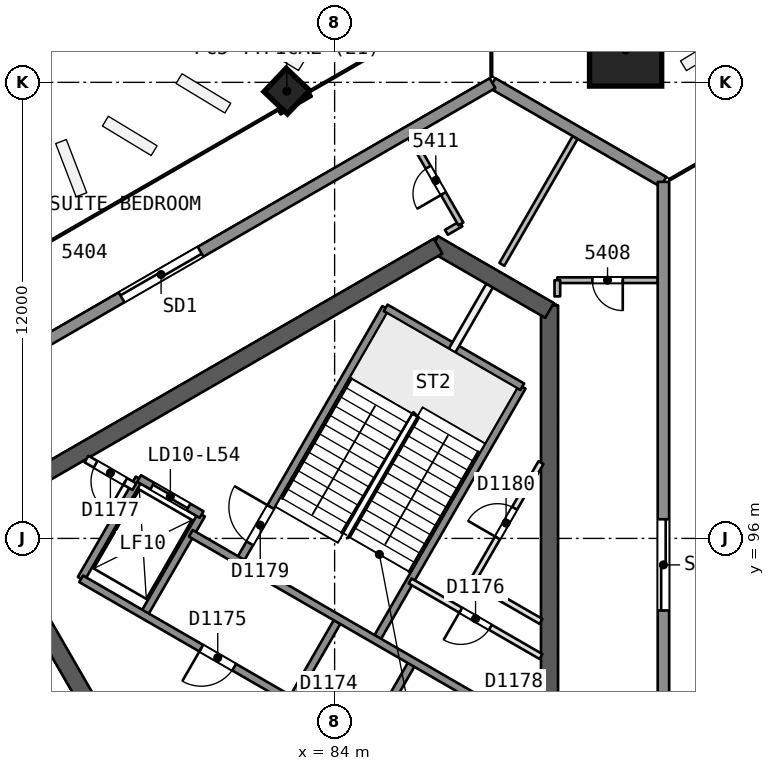
"""IFC4 building model, lengths in metres.
Left out: names, types, materials, properties, quantities, classifications, styles, units other than length and angle.
Written with IfcOpenShell. Run it as: python <this file> out.ifc"""

import sys

from ifc_helpers import new_model, si_unit, direction, frame, frame_2d, origin, origin_2d, place, context, subcontext, project, spatial, rectangle, extrude, element, fill, save


model = new_model("IFC4")
c1 = context("Model", 3, precision=1e-05, world=origin(), true_north=direction((0.0, 1.0)))
c2 = subcontext(c1, "Body", "Model", "MODEL_VIEW")
j1 = project(units=[si_unit("LENGTHUNIT", "METRE"), si_unit("PLANEANGLEUNIT", "RADIAN")], contexts=[c1])
p1 = place(None, origin())
s1 = spatial("IfcSite", under=j1, at=p1, CompositionType="ELEMENT")
p2 = place(p1, origin())
s2 = spatial("IfcBuilding", under=s1, at=p2, CompositionType="ELEMENT")
p3 = place(p2, frame((0.0, 0.0, 220.6)))
s3 = spatial("IfcBuildingStorey", under=s2, at=p3, CompositionType="ELEMENT", Elevation=220.6)
p4 = place(p3, frame((89.655, 88.019, 0.0), z_axis=(0.0, 0.0, 1.0), x_axis=(0.0, 1.0, 0.0)))
e1 = element("IfcWall", 1, at=p4, inside=s3, PredefinedType="SHEAR", context=c2, shape_type="SweptSolid", body=[
    extrude(rectangle(XDim=14.108, YDim=0.45, at=frame_2d((7.054, 0.0))), origin(), (0.0, 0.0, 1.0), 3.7),
])
p5 = place(p3, frame((89.655, 101.998, 0.0), z_axis=(0.0, 0.0, 1.0), x_axis=(-0.866042179588, 0.49997094233, 0.0)))
e2 = element("IfcWall", 2, at=p5, inside=s3, PredefinedType="SHEAR", context=c2, shape_type="SweptSolid", body=[
    extrude(rectangle(XDim=3.515, YDim=0.45, at=frame_2d((1.758, 0.0))), origin(), (0.0, 0.0, 1.0), 3.7),
])
p6 = place(p3, frame((86.723, 103.69, 0.0), z_axis=(0.0, 0.0, 1.0), x_axis=(-0.866022713978, -0.500004658852, 0.0)))
e3 = element("IfcWall", 3, at=p6, inside=s3, PredefinedType="SHEAR", context=c2, shape_type="SweptSolid", body=[
    extrude(rectangle(XDim=14.203, YDim=0.45, at=frame_2d((7.102, 0.0))), origin(), (0.0, 0.0, 1.0), 3.7),
])
p7 = place(p3, frame((74.617, 96.701, 0.0), z_axis=(0.0, 0.0, 1.0), x_axis=(0.499994385119, -0.866028645513, 0.0)))
e4 = element("IfcWall", 4, at=p7, inside=s3, PredefinedType="SHEAR", context=c2, shape_type="SweptSolid", body=[
    extrude(rectangle(XDim=10.155, YDim=0.45, at=frame_2d((5.077, 0.0))), origin(), (0.0, 0.0, 1.0), 3.7),
])
p8 = place(p7, frame((8.005, 0.0, 0.0)))
e5 = element("IfcOpeningElement", 5, at=p8, cuts=e4, PredefinedType="OPENING", context=c2, shape_type="SweptSolid", body=[
    extrude(rectangle(XDim=1.2, YDim=2.1, at=frame_2d((0.6, 1.05))), frame((0.0, 0.235, 0.0), z_axis=(0.0, -1.0, 0.0), x_axis=(1.0, 0.0, 0.0)), (0.0, 0.0, 1.0), 0.471),
])
p9 = place(p3, frame((91.678, 108.888, 0.0), z_axis=(-0.017607037296, -0.030466109479, 0.999380712447), x_axis=(0.500064653071, 0.865272876704, 0.035187946645)))
e6 = element("IfcColumn", 6, at=p9, inside=s3, PredefinedType="COLUMN", context=c2, shape_type="SweptSolid", body=[
    extrude(rectangle(XDim=1.9, YDim=1.9, at=origin_2d()), origin(), (0.0, 0.0, 1.0), 3.702),
])
p10 = place(p3, frame((82.752, 107.803, 0.0), z_axis=(-0.00837646992, -0.028097450282, 0.999570091609), x_axis=(0.866174253108, 0.499288249334, 0.021293363534)))
e7 = element("IfcColumn", 7, at=p10, inside=s3, PredefinedType="COLUMN", context=c2, shape_type="SweptSolid", body=[
    extrude(rectangle(XDim=0.85, YDim=0.85, at=origin_2d()), origin(), (0.0, 0.0, 1.0), 3.702),
])
p11 = place(p3, frame((92.503, 102.794, 0.0), z_axis=(0.0, 0.0, 1.0), x_axis=(-1.0, 0.0, 0.0)))
e8 = element("IfcWall", 8, at=p11, inside=s3, PredefinedType="PARTITIONING", context=c2, shape_type="SweptSolid", body=[
    extrude(rectangle(XDim=2.642, YDim=0.15, at=frame_2d((1.321, 0.0))), origin(), (0.0, 0.0, 1.0), 3.3),
])
p12 = place(p11, frame((0.921, 0.0, 0.0)))
e9 = element("IfcOpeningElement", 9, at=p12, cuts=e8, PredefinedType="OPENING", context=c2, shape_type="SweptSolid", body=[
    extrude(rectangle(XDim=0.8, YDim=2.1, at=frame_2d((0.4, 1.05))), frame((0.0, 0.085, 0.0), z_axis=(0.0, -1.0, 0.0), x_axis=(1.0, 0.0, 0.0)), (0.0, 0.0, 1.0), 0.171),
])
p13 = place(p3, frame((89.861, 102.794, 0.0), z_axis=(0.0, 0.0, 1.0), x_axis=(0.0, -1.0, 0.0)))
e10 = element("IfcWall", 10, at=p13, inside=s3, PredefinedType="PARTITIONING", context=c2, shape_type="SweptSolid", body=[
    extrude(rectangle(XDim=0.426, YDim=0.15, at=frame_2d((0.213, 0.0))), origin(), (0.0, 0.0, 1.0), 3.3),
])
p14 = place(p3, frame((90.33, 106.55, 0.0), z_axis=(0.0, 0.0, 1.0), x_axis=(-0.499980071345, -0.866036909293, 0.0)))
e11 = element("IfcWall", 11, at=p14, inside=s3, PredefinedType="PARTITIONING", context=c2, shape_type="SweptSolid", body=[
    extrude(rectangle(XDim=3.856, YDim=0.15, at=frame_2d((1.928, 0.0))), origin(), (0.0, 0.0, 1.0), 3.3),
])
p15 = place(p3, frame((86.941, 104.054, 0.0), z_axis=(0.0, 0.0, 1.0), x_axis=(0.866019606374, 0.500010041276, 0.0)))
e12 = element("IfcWall", 12, at=p15, inside=s3, PredefinedType="PARTITIONING", context=c2, shape_type="SweptSolid", body=[
    extrude(rectangle(XDim=0.441, YDim=0.15, at=frame_2d((0.22, 0.0))), origin(), (0.0, 0.0, 1.0), 3.3),
])
p16 = place(p3, frame((87.323, 104.275, 0.0), z_axis=(0.0, 0.0, 1.0), x_axis=(-0.50000507839, 0.866022471755, 0.0)))
e13 = element("IfcWall", 13, at=p16, inside=s3, PredefinedType="PARTITIONING", context=c2, shape_type="SweptSolid", body=[
    extrude(rectangle(XDim=2.642, YDim=0.15, at=frame_2d((1.321, 0.0))), origin(), (0.0, 0.0, 1.0), 3.3),
])
p17 = place(p16, frame((0.921, 0.0, 0.0)))
e14 = element("IfcOpeningElement", 14, at=p17, cuts=e13, PredefinedType="OPENING", context=c2, shape_type="SweptSolid", body=[
    extrude(rectangle(XDim=0.8, YDim=2.1, at=frame_2d((0.4, 1.05))), frame((0.0, 0.085, 0.0), z_axis=(0.0, -1.0, 0.0), x_axis=(1.0, 0.0, 0.0)), (0.0, 0.0, 1.0), 0.171),
])
p18 = place(p3, frame((88.155, 107.978, 0.0), z_axis=(0.0, 0.0, 1.0), x_axis=(0.866044673852, -0.499966621779, 0.0)))
e15 = element("IfcWall", 15, at=p18, inside=s3, PredefinedType="SOLIDWALL", context=c2, shape_type="SweptSolid", body=[
    extrude(rectangle(XDim=5.193, YDim=0.3, at=frame_2d((2.597, 0.0))), origin(), (0.0, 0.0, 1.0), 3.3),
])
p19 = place(p3, frame((92.652, 105.381, 0.0), z_axis=(0.0, 0.0, 1.0), x_axis=(0.0, -1.0, 0.0)))
e16 = element("IfcWall", 16, at=p19, inside=s3, PredefinedType="SOLIDWALL", context=c2, shape_type="SweptSolid", body=[
    extrude(rectangle(XDim=50.762, YDim=0.3, at=frame_2d((25.381, 0.0))), origin(), (0.0, 0.0, 1.0), 3.3),
])
p20 = place(p19, frame((29.325, 0.0, 0.0)))
e17 = element("IfcOpeningElement", 17, at=p20, cuts=e16, PredefinedType="OPENING", context=c2, shape_type="SweptSolid", body=[
    extrude(rectangle(XDim=2.4, YDim=2.4, at=frame_2d((1.2, 1.2))), frame((0.0, 0.161, 0.0), z_axis=(0.0, -1.0, 0.0), x_axis=(1.0, 0.0, 0.0)), (0.0, 0.0, 1.0), 0.321),
])
p21 = place(p19, frame((39.492, 0.0, 0.0)))
e18 = element("IfcOpeningElement", 18, at=p21, cuts=e16, PredefinedType="OPENING", context=c2, shape_type="SweptSolid", body=[
    extrude(rectangle(XDim=2.4, YDim=2.4, at=frame_2d((1.2, 1.2))), frame((0.0, 0.161, 0.0), z_axis=(0.0, -1.0, 0.0), x_axis=(1.0, 0.0, 0.0)), (0.0, 0.0, 1.0), 0.321),
])
p22 = place(p19, frame((18.881, 0.0, 0.0)))
e19 = element("IfcOpeningElement", 19, at=p22, cuts=e16, PredefinedType="OPENING", context=c2, shape_type="SweptSolid", body=[
    extrude(rectangle(XDim=2.4, YDim=2.4, at=frame_2d((1.2, 1.2))), frame((0.0, 0.161, 0.0), z_axis=(0.0, -1.0, 0.0), x_axis=(1.0, 0.0, 0.0)), (0.0, 0.0, 1.0), 0.321),
])
p23 = place(p19, frame((8.878, 0.0, 0.0)))
e20 = element("IfcOpeningElement", 20, at=p23, cuts=e16, PredefinedType="OPENING", context=c2, shape_type="SweptSolid", body=[
    extrude(rectangle(XDim=2.4, YDim=2.4, at=frame_2d((1.2, 1.2))), frame((0.0, 0.161, 0.0), z_axis=(0.0, -1.0, 0.0), x_axis=(1.0, 0.0, 0.0)), (0.0, 0.0, 1.0), 0.321),
])
p24 = place(p19, frame((24.025, 0.0, 0.0)))
e21 = element("IfcOpeningElement", 21, at=p24, cuts=e16, PredefinedType="OPENING", context=c2, shape_type="SweptSolid", body=[
    extrude(rectangle(XDim=2.4, YDim=2.4, at=frame_2d((1.2, 1.2))), frame((0.0, 0.161, 0.0), z_axis=(0.0, -1.0, 0.0), x_axis=(1.0, 0.0, 0.0)), (0.0, 0.0, 1.0), 0.321),
])
p25 = place(p3, frame((44.193, 82.596, 0.0), z_axis=(0.0, 0.0, 1.0), x_axis=(0.866024521231, 0.500001528624, 0.0)))
e22 = element("IfcWall", 22, at=p25, inside=s3, PredefinedType="SOLIDWALL", context=c2, shape_type="SweptSolid", body=[
    extrude(rectangle(XDim=50.762, YDim=0.3, at=frame_2d((25.381, 0.0))), origin(), (0.0, 0.0, 1.0), 3.3),
])
p26 = place(p25, frame((24.337, 0.0, 0.0)))
e23 = element("IfcOpeningElement", 23, at=p26, cuts=e22, PredefinedType="OPENING", context=c2, shape_type="SweptSolid", body=[
    extrude(rectangle(XDim=2.4, YDim=2.4, at=frame_2d((1.2, 1.2))), frame((0.0, 0.161, 0.0), z_axis=(0.0, -1.0, 0.0), x_axis=(1.0, 0.0, 0.0)), (0.0, 0.0, 1.0), 0.321),
])
p27 = place(p25, frame((29.325, 0.0, 0.0)))
e24 = element("IfcOpeningElement", 24, at=p27, cuts=e22, PredefinedType="OPENING", context=c2, shape_type="SweptSolid", body=[
    extrude(rectangle(XDim=2.4, YDim=2.4, at=frame_2d((1.2, 1.2))), frame((0.0, 0.161, 0.0), z_axis=(0.0, -1.0, 0.0), x_axis=(1.0, 0.0, 0.0)), (0.0, 0.0, 1.0), 0.321),
])
p28 = place(p25, frame((39.492, 0.0, 0.0)))
e25 = element("IfcOpeningElement", 25, at=p28, cuts=e22, PredefinedType="OPENING", context=c2, shape_type="SweptSolid", body=[
    extrude(rectangle(XDim=2.4, YDim=2.4, at=frame_2d((1.2, 1.2))), frame((0.0, 0.161, 0.0), z_axis=(0.0, -1.0, 0.0), x_axis=(1.0, 0.0, 0.0)), (0.0, 0.0, 1.0), 0.321),
])
p29 = place(p25, frame((19.193, 0.0, 0.0)))
e26 = element("IfcOpeningElement", 26, at=p29, cuts=e22, PredefinedType="OPENING", context=c2, shape_type="SweptSolid", body=[
    extrude(rectangle(XDim=2.4, YDim=2.4, at=frame_2d((1.2, 1.2))), frame((0.0, 0.161, 0.0), z_axis=(0.0, -1.0, 0.0), x_axis=(1.0, 0.0, 0.0)), (0.0, 0.0, 1.0), 0.321),
])
p30 = place(p25, frame((8.878, 0.0, 0.0)))
e27 = element("IfcOpeningElement", 27, at=p30, cuts=e22, PredefinedType="OPENING", context=c2, shape_type="SweptSolid", body=[
    extrude(rectangle(XDim=2.4, YDim=2.4, at=frame_2d((1.2, 1.2))), frame((0.0, 0.161, 0.0), z_axis=(0.0, -1.0, 0.0), x_axis=(1.0, 0.0, 0.0)), (0.0, 0.0, 1.0), 0.321),
])
p31 = place(p3, frame((87.621, 94.86, 0.0), z_axis=(0.0, 0.0, 1.0), x_axis=(0.499993116331, 0.866029378036, 0.0)))
e28 = element("IfcWall", 28, at=p31, inside=s3, PredefinedType="PARTITIONING", context=c2, shape_type="SweptSolid", body=[
    extrude(rectangle(XDim=3.618, YDim=0.15, at=frame_2d((1.809, 0.0))), origin(), (0.0, 0.0, 1.0), 3.3),
])
p32 = place(p31, frame((1.332, 0.0, 0.0)))
e29 = element("IfcOpeningElement", 29, at=p32, cuts=e28, PredefinedType="OPENING", context=c2, shape_type="SweptSolid", body=[
    extrude(rectangle(XDim=0.9, YDim=2.1, at=frame_2d((0.45, 1.05))), frame((0.0, 0.085, 0.0), z_axis=(0.0, -1.0, 0.0), x_axis=(1.0, 0.0, 0.0)), (0.0, 0.0, 1.0), 0.171),
])
p33 = place(p3, frame((84.821, 90.611, 0.0), z_axis=(0.0, 0.0, 1.0), x_axis=(0.499961042966, 0.86604789447, 0.0)))
e30 = element("IfcWall", 30, at=p33, inside=s3, PredefinedType="SOLIDWALL", context=c2, shape_type="SweptSolid", body=[
    extrude(rectangle(XDim=2.48, YDim=0.2, at=frame_2d((1.24, 0.0))), origin(), (0.0, 0.0, 1.0), 3.3),
])
p34 = place(p3, frame((85.087, 93.321, 0.0), z_axis=(0.0, 0.0, 1.0), x_axis=(0.500019787375, 0.866013979237, 0.0)))
e31 = element("IfcWall", 31, at=p34, inside=s3, PredefinedType="SOLIDWALL", context=c2, shape_type="SweptSolid", body=[
    extrude(rectangle(XDim=7.7, YDim=0.2, at=frame_2d((3.85, 0.0))), origin(), (0.0, 0.0, 1.0), 3.3),
])
p35 = place(p3, frame((82.873, 91.736, 0.0), z_axis=(0.0, 0.0, 1.0), x_axis=(0.499961042966, 0.86604789447, 0.0)))
e32 = element("IfcWall", 32, at=p35, inside=s3, PredefinedType="SOLIDWALL", context=c2, shape_type="SweptSolid", body=[
    extrude(rectangle(XDim=2.48, YDim=0.2, at=frame_2d((1.24, 0.0))), origin(), (0.0, 0.0, 1.0), 3.3),
])
p36 = place(p3, frame((87.09, 100.94, 0.0), z_axis=(0.0, 0.0, 1.0), x_axis=(0.500011643316, 0.866018681408, 0.0)))
e33 = element("IfcWall", 33, at=p36, inside=s3, PredefinedType="PARTITIONING", context=c2, shape_type="SweptSolid", body=[
    extrude(rectangle(XDim=1.973, YDim=0.2, at=frame_2d((0.987, 0.0))), origin(), (0.0, 0.0, 1.0), 3.3),
])
p37 = place(p3, frame((81.493, 95.396, 0.0), z_axis=(0.0, 0.0, 1.0), x_axis=(0.500006057782, 0.866021906294, 0.0)))
e34 = element("IfcWall", 34, at=p37, inside=s3, PredefinedType="SOLIDWALL", context=c2, shape_type="SweptSolid", body=[
    extrude(rectangle(XDim=7.7, YDim=0.2, at=frame_2d((3.85, 0.0))), origin(), (0.0, 0.0, 1.0), 3.3),
])
p38 = place(p37, frame((0.55, 0.0, 0.0)))
e35 = element("IfcOpeningElement", 35, at=p38, cuts=e34, PredefinedType="OPENING", context=c2, shape_type="SweptSolid", body=[
    extrude(rectangle(XDim=1.1, YDim=2.1, at=frame_2d((0.55, 1.05))), frame((0.0, 0.11, 0.0), z_axis=(0.0, -1.0, 0.0), x_axis=(1.0, 0.0, 0.0)), (0.0, 0.0, 1.0), 0.221),
])
for number, where, z_axis, x_axis in (
    (36, (78.976, 93.986, 0.0), (0.0, 0.0, 1.0), (0.5, 0.866, 0.0)),
    (37, (77.33, 94.936, 0.0), (0.0, 0.0, 1.0), (0.5, 0.866, 0.0)),
):
    element("IfcWall", number, at=place(p3, frame(where, z_axis=z_axis, x_axis=x_axis)), inside=s3, PredefinedType="SOLIDWALL", context=c2, shape_type="SweptSolid", body=[
        extrude(rectangle(XDim=3.05, YDim=0.2, at=frame_2d((1.525, 0.0))), origin(), (0.0, 0.0, 1.0), 3.3),
    ])
p39 = place(p3, frame((86.77, 89.486, 0.0), z_axis=(0.0, 0.0, 1.0), x_axis=(-0.86601811187, 0.500012629753, 0.0)))
e38 = element("IfcWall", 38, at=p39, inside=s3, PredefinedType="SOLIDWALL", context=c2, shape_type="SweptSolid", body=[
    extrude(rectangle(XDim=10.9, YDim=0.2, at=frame_2d((5.45, 0.0))), origin(), (0.0, 0.0, 1.0), 3.3),
])
p40 = place(p39, frame((0.625, 0.0, 0.0)))
e39 = element("IfcOpeningElement", 39, at=p40, cuts=e38, PredefinedType="OPENING", context=c2, shape_type="SweptSolid", body=[
    extrude(rectangle(XDim=1.0, YDim=2.1, at=frame_2d((0.5, 1.05))), frame((0.0, 0.11, 0.0), z_axis=(0.0, -1.0, 0.0), x_axis=(1.0, 0.0, 0.0)), (0.0, 0.0, 1.0), 0.221),
])
p41 = place(p39, frame((2.875, 0.0, 0.0)))
e40 = element("IfcOpeningElement", 40, at=p41, cuts=e38, PredefinedType="OPENING", context=c2, shape_type="SweptSolid", body=[
    extrude(rectangle(XDim=1.0, YDim=2.1, at=frame_2d((0.5, 1.05))), frame((0.0, 0.11, 0.0), z_axis=(0.0, -1.0, 0.0), x_axis=(1.0, 0.0, 0.0)), (0.0, 0.0, 1.0), 0.221),
])
p42 = place(p39, frame((6.25, 0.0, 0.0)))
e41 = element("IfcOpeningElement", 41, at=p42, cuts=e38, PredefinedType="OPENING", context=c2, shape_type="SweptSolid", body=[
    extrude(rectangle(XDim=1.0, YDim=2.1, at=frame_2d((0.5, 1.05))), frame((0.0, 0.11, 0.0), z_axis=(0.0, -1.0, 0.0), x_axis=(1.0, 0.0, 0.0)), (0.0, 0.0, 1.0), 0.221),
])
p43 = place(p3, frame((89.43, 90.814, 0.0), z_axis=(0.0, 0.0, 1.0), x_axis=(-0.866018983788, 0.500011119594, 0.0)))
e42 = element("IfcWall", 42, at=p43, inside=s3, PredefinedType="SOLIDWALL", context=c2, shape_type="SweptSolid", body=[
    extrude(rectangle(XDim=10.64, YDim=0.2, at=frame_2d((5.32, 0.0))), origin(), (0.0, 0.0, 1.0), 3.3),
])
p44 = place(p43, frame((0.37, 0.0, 0.0)))
e43 = element("IfcOpeningElement", 43, at=p44, cuts=e42, PredefinedType="OPENING", context=c2, shape_type="SweptSolid", body=[
    extrude(rectangle(XDim=0.9, YDim=2.1, at=frame_2d((0.45, 1.05))), frame((0.0, 0.11, 0.0), z_axis=(0.0, -1.0, 0.0), x_axis=(1.0, 0.0, 0.0)), (0.0, 0.0, 1.0), 0.221),
])
p45 = place(p3, frame((78.73, 97.361, 0.0), z_axis=(0.0, 0.0, 1.0), x_axis=(-0.866045896294, 0.499964504253, 0.0)))
e44 = element("IfcWall", 44, at=p45, inside=s3, PredefinedType="PARTITIONING", context=c2, shape_type="SweptSolid", body=[
    extrude(rectangle(XDim=1.455, YDim=0.2, at=frame_2d((0.728, 0.0))), origin(), (0.0, 0.0, 1.0), 3.3),
])
p46 = place(p45, frame((0.278, 0.0, 0.0)))
e45 = element("IfcOpeningElement", 45, at=p46, cuts=e44, PredefinedType="OPENING", context=c2, shape_type="SweptSolid", body=[
    extrude(rectangle(XDim=0.9, YDim=2.1, at=frame_2d((0.45, 1.05))), frame((0.0, 0.11, 0.0), z_axis=(0.0, -1.0, 0.0), x_axis=(1.0, 0.0, 0.0)), (0.0, 0.0, 1.0), 0.221),
])
p47 = place(p3, frame((80.5, 96.627, 0.0), z_axis=(0.0, 0.0, 1.0), x_axis=(-0.86601224135, 0.500022797313, 0.0)))
e46 = element("IfcWall", 46, at=p47, inside=s3, PredefinedType="SOLIDWALL", context=c2, shape_type="SweptSolid", body=[
    extrude(rectangle(XDim=1.9, YDim=0.2, at=frame_2d((0.95, 0.0))), origin(), (0.0, 0.0, 1.0), 3.3),
])
p48 = place(p47, frame((0.4, 0.0, 0.0)))
e47 = element("IfcOpeningElement", 47, at=p48, cuts=e46, PredefinedType="OPENING", context=c2, shape_type="SweptSolid", body=[
    extrude(rectangle(XDim=1.1, YDim=2.1, at=frame_2d((0.55, 1.05))), frame((0.0, 0.11, 0.0), z_axis=(0.0, -1.0, 0.0), x_axis=(1.0, 0.0, 0.0)), (0.0, 0.0, 1.0), 0.221),
])
p49 = place(p3, frame((89.43, 92.892, 0.0), z_axis=(0.0, 0.0, 1.0), x_axis=(-0.866019912421, 0.500009511199, 0.0)))
e48 = element("IfcWall", 48, at=p49, inside=s3, PredefinedType="PARTITIONING", context=c2, shape_type="SweptSolid", body=[
    extrude(rectangle(XDim=3.976, YDim=0.15, at=frame_2d((1.988, 0.0))), origin(), (0.0, 0.0, 1.0), 3.3),
])
p50 = place(p49, frame((1.538, 0.0, 0.0)))
e49 = element("IfcOpeningElement", 49, at=p50, cuts=e48, PredefinedType="OPENING", context=c2, shape_type="SweptSolid", body=[
    extrude(rectangle(XDim=0.9, YDim=2.1, at=frame_2d((0.45, 1.05))), frame((0.0, 0.085, 0.0), z_axis=(0.0, -1.0, 0.0), x_axis=(1.0, 0.0, 0.0)), (0.0, 0.0, 1.0), 0.171),
])
p51 = place(p3, frame((89.43, 93.816, 0.0), z_axis=(0.0, 0.0, 1.0), x_axis=(-0.866004557827, 0.500036104519, 0.0)))
e50 = element("IfcWall", 50, at=p51, inside=s3, PredefinedType="PARTITIONING", context=c2, shape_type="SweptSolid", body=[
    extrude(rectangle(XDim=2.089, YDim=0.15, at=frame_2d((1.044, 0.0))), origin(), (0.0, 0.0, 1.0), 3.3),
])
p52 = place(p3, frame((88.937, 99.99, 0.0), z_axis=(0.0, 0.0, 1.0), x_axis=(-0.866004344652, 0.500036473714, 0.0)))
e51 = element("IfcWall", 51, at=p52, inside=s3, PredefinedType="SOLIDWALL", context=c2, shape_type="SweptSolid", body=[
    extrude(rectangle(XDim=4.15, YDim=0.2, at=frame_2d((2.075, 0.0))), origin(), (0.0, 0.0, 1.0), 3.3),
])
p53 = place(p12, origin())
e52 = element("IfcDoor", 52, at=p53, inside=s3, OperationType="SINGLE_SWING_LEFT", PredefinedType="NOTDEFINED", context=c2, shape_type="SweptSolid", body=[
    extrude(rectangle(XDim=0.8, YDim=2.1, at=frame_2d((0.4, 1.05))), frame((0.0, 0.025, 0.0), z_axis=(0.0, -1.0, 0.0), x_axis=(1.0, 0.0, 0.0)), (0.0, 0.0, 1.0), 0.05),
])
fill(e9, e52)
p54 = place(p17, origin())
e53 = element("IfcDoor", 53, at=p54, inside=s3, OperationType="SINGLE_SWING_LEFT", PredefinedType="NOTDEFINED", context=c2, shape_type="SweptSolid", body=[
    extrude(rectangle(XDim=0.8, YDim=2.1, at=frame_2d((0.4, 1.05))), frame((0.0, 0.025, 0.0), z_axis=(0.0, -1.0, 0.0), x_axis=(1.0, 0.0, 0.0)), (0.0, 0.0, 1.0), 0.05),
])
fill(e14, e53)
p55 = place(p23, origin())
e54 = element("IfcDoor", 54, at=p55, inside=s3, OperationType="SLIDING_TO_RIGHT", PredefinedType="NOTDEFINED", context=c2, shape_type="SweptSolid", body=[
    extrude(rectangle(XDim=2.4, YDim=2.4, at=frame_2d((1.2, 1.2))), frame((0.0, 0.025, 0.0), z_axis=(0.0, -1.0, 0.0), x_axis=(1.0, 0.0, 0.0)), (0.0, 0.0, 1.0), 0.05),
])
fill(e20, e54)
p56 = place(p28, origin())
e55 = element("IfcDoor", 55, at=p56, inside=s3, OperationType="SLIDING_TO_LEFT", PredefinedType="NOTDEFINED", context=c2, shape_type="SweptSolid", body=[
    extrude(rectangle(XDim=2.4, YDim=2.4, at=frame_2d((1.2, 1.2))), frame((0.0, 0.025, 0.0), z_axis=(0.0, -1.0, 0.0), x_axis=(1.0, 0.0, 0.0)), (0.0, 0.0, 1.0), 0.05),
])
fill(e25, e55)
p57 = place(p48, origin())
e56 = element("IfcDoor", 56, at=p57, inside=s3, OperationType="SLIDING_TO_RIGHT", PredefinedType="NOTDEFINED", context=c2, shape_type="SweptSolid", body=[
    extrude(rectangle(XDim=1.1, YDim=2.1, at=frame_2d((0.55, 1.05))), frame((0.0, 0.025, 0.0), z_axis=(0.0, -1.0, 0.0), x_axis=(1.0, 0.0, 0.0)), (0.0, 0.0, 1.0), 0.05),
])
fill(e47, e56)
p58 = place(p42, origin())
e57 = element("IfcDoor", 57, at=p58, inside=s3, OperationType="SINGLE_SWING_RIGHT", PredefinedType="NOTDEFINED", context=c2, shape_type="SweptSolid", body=[
    extrude(rectangle(XDim=1.0, YDim=2.1, at=frame_2d((0.5, 1.05))), frame((0.0, 0.025, 0.0), z_axis=(0.0, -1.0, 0.0), x_axis=(1.0, 0.0, 0.0)), (0.0, 0.0, 1.0), 0.05),
])
fill(e41, e57)
p59 = place(p50, origin())
e58 = element("IfcDoor", 58, at=p59, inside=s3, OperationType="SINGLE_SWING_RIGHT", PredefinedType="NOTDEFINED", context=c2, shape_type="SweptSolid", body=[
    extrude(rectangle(XDim=0.9, YDim=2.1, at=frame_2d((0.45, 1.05))), frame((0.0, 0.025, 0.0), z_axis=(0.0, -1.0, 0.0), x_axis=(1.0, 0.0, 0.0)), (0.0, 0.0, 1.0), 0.05),
])
fill(e49, e58)
p60 = place(p46, origin())
e59 = element("IfcDoor", 59, at=p60, inside=s3, OperationType="SINGLE_SWING_LEFT", PredefinedType="NOTDEFINED", context=c2, shape_type="SweptSolid", body=[
    extrude(rectangle(XDim=0.9, YDim=2.1, at=frame_2d((0.45, 1.05))), frame((0.0, 0.025, 0.0), z_axis=(0.0, -1.0, 0.0), x_axis=(1.0, 0.0, 0.0)), (0.0, 0.0, 1.0), 0.05),
])
fill(e45, e59)
p61 = place(p38, origin())
e60 = element("IfcDoor", 60, at=p61, inside=s3, OperationType="SINGLE_SWING_RIGHT", PredefinedType="NOTDEFINED", context=c2, shape_type="SweptSolid", body=[
    extrude(rectangle(XDim=1.1, YDim=2.1, at=frame_2d((0.55, 1.05))), frame((0.0, 0.025, 0.0), z_axis=(0.0, -1.0, 0.0), x_axis=(1.0, 0.0, 0.0)), (0.0, 0.0, 1.0), 0.05),
])
fill(e35, e60)
p62 = place(p32, origin())
e61 = element("IfcDoor", 61, at=p62, inside=s3, OperationType="SINGLE_SWING_LEFT", PredefinedType="NOTDEFINED", context=c2, shape_type="SweptSolid", body=[
    extrude(rectangle(XDim=0.9, YDim=2.1, at=frame_2d((0.45, 1.05))), frame((0.0, 0.025, 0.0), z_axis=(0.0, -1.0, 0.0), x_axis=(1.0, 0.0, 0.0)), (0.0, 0.0, 1.0), 0.05),
])
fill(e29, e61)
save(model, sys.argv[1])
